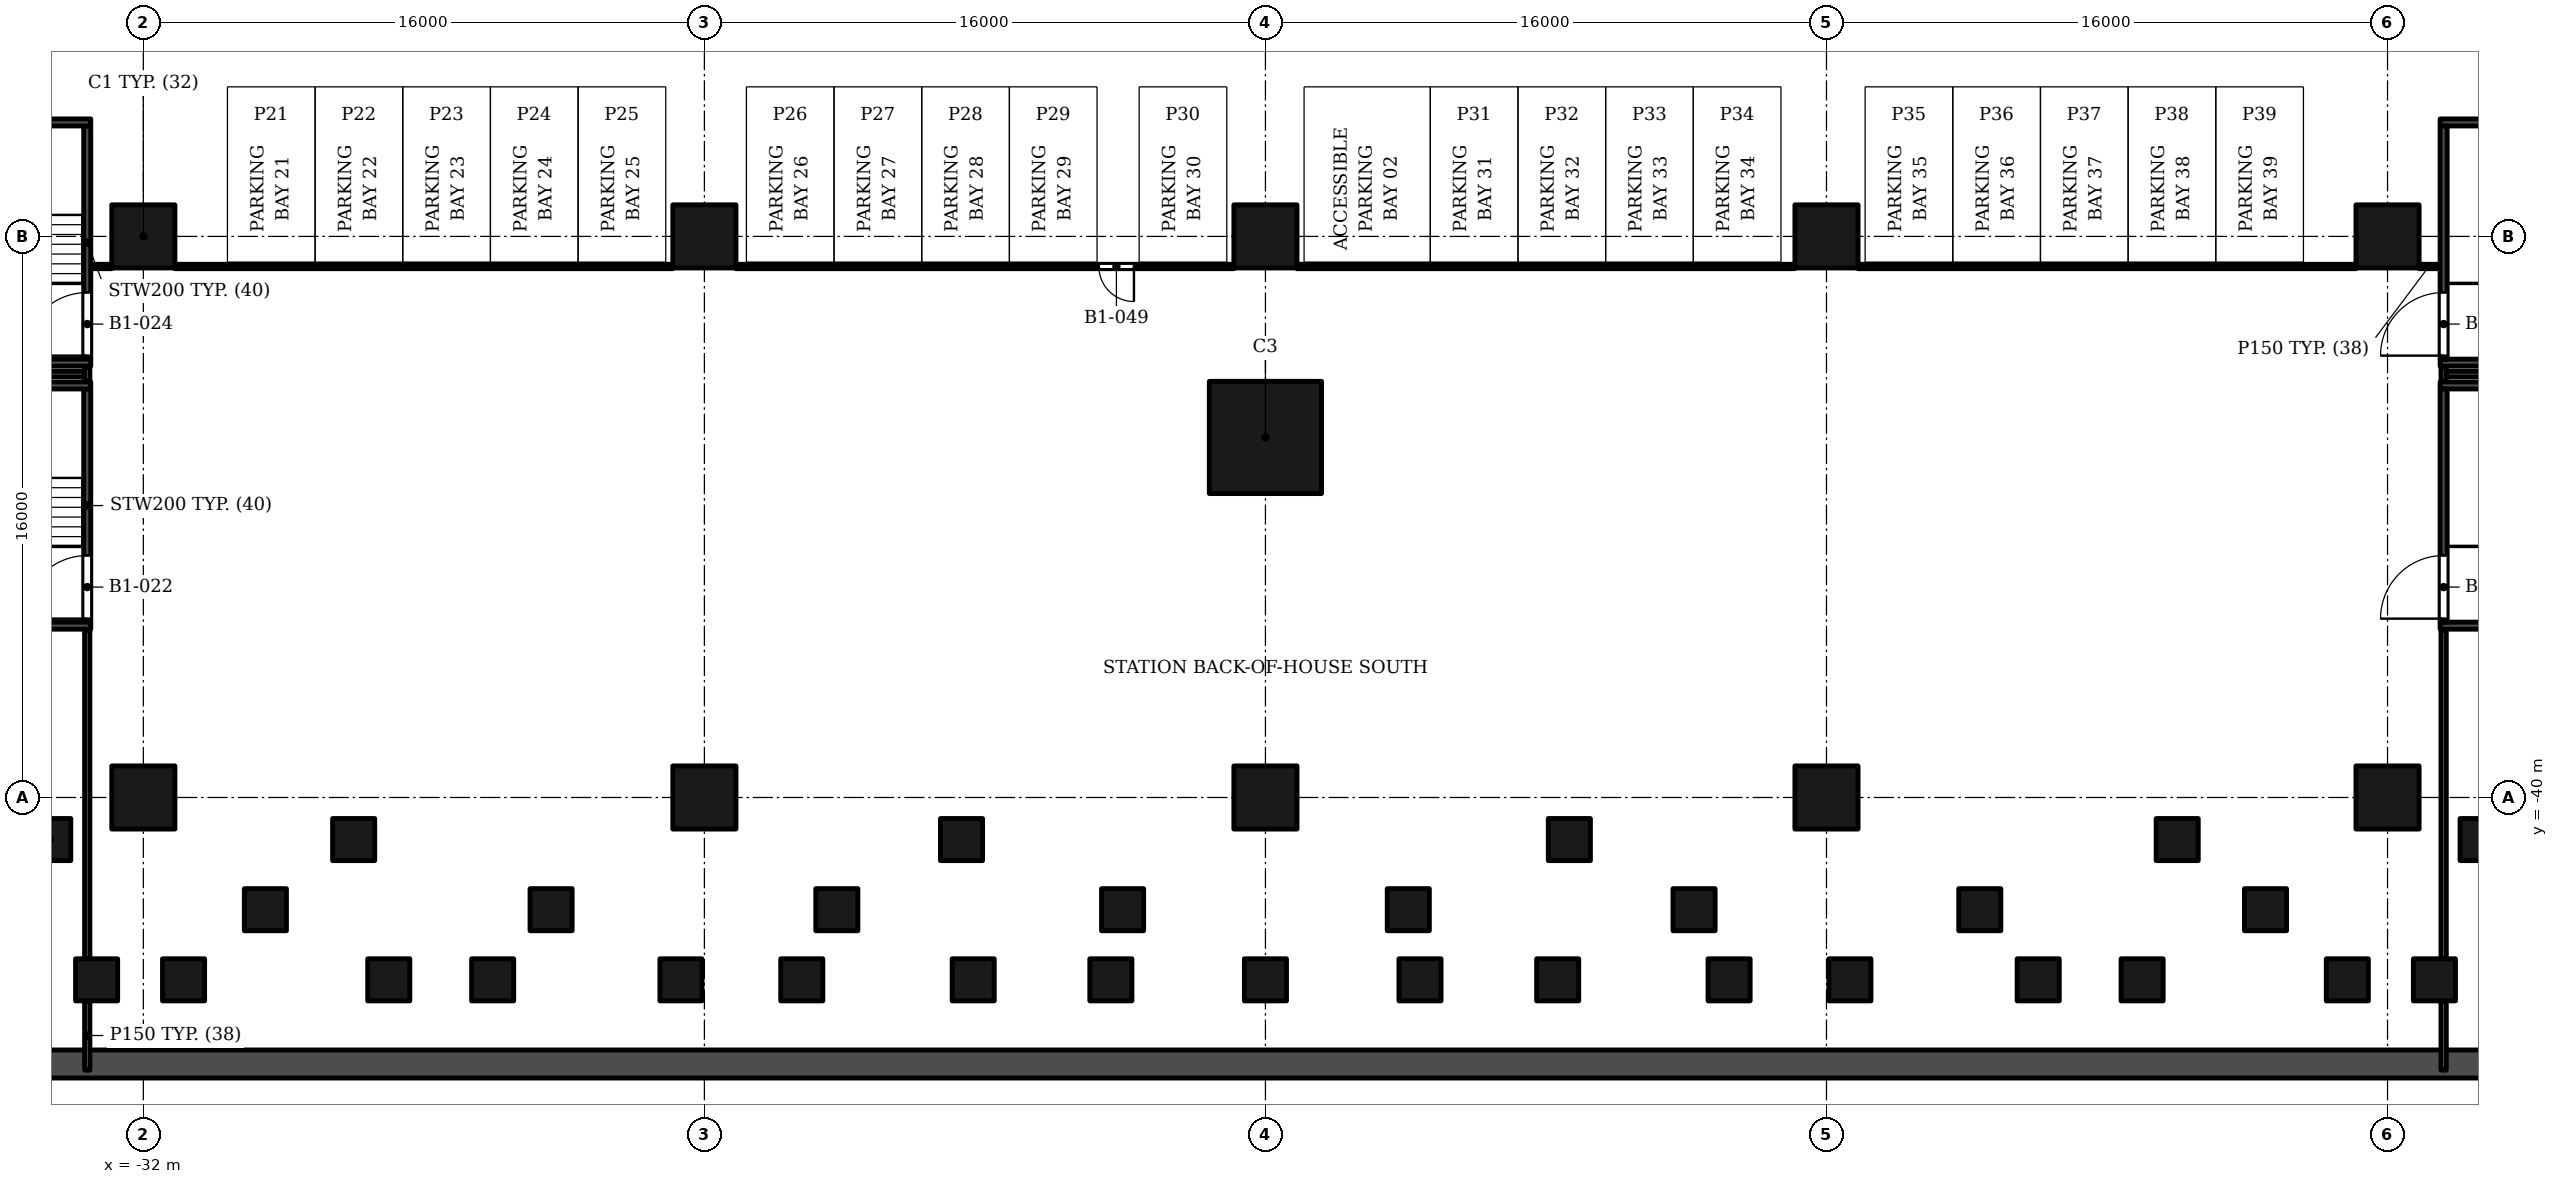
"""IFC4 building model, lengths in metres.
Left out: names, types, materials, properties, quantities, classifications, styles, units other than length and angle.
Written with IfcOpenShell. Run it as: python <this file> out.ifc"""

import sys

from ifc_helpers import new_model, si_unit, direction, frame, frame_2d, origin, origin_2d, place, context, subcontext, project, spatial, rectangle, extrude, element, fill, save


model = new_model("IFC4")
c1 = context("Model", 3, precision=1e-05, world=origin(), true_north=direction((0.0, 1.0)))
c2 = subcontext(c1, "Body", "Model", "MODEL_VIEW")
j1 = project(units=[si_unit("LENGTHUNIT", "METRE"), si_unit("PLANEANGLEUNIT", "RADIAN")], contexts=[c1])
p1 = place(None, origin())
s1 = spatial("IfcSite", under=j1, at=p1, CompositionType="ELEMENT")
p2 = place(p1, origin())
s2 = spatial("IfcBuilding", under=s1, at=p2, CompositionType="ELEMENT")
p3 = place(p2, frame((0.0, 0.0, -5.0)))
s3 = spatial("IfcBuildingStorey", under=s2, at=p3, CompositionType="ELEMENT", Elevation=-5.0)
p4 = place(p3, frame((-46.0, -47.6, 0.0), z_axis=(0.0, 0.0, 1.0), x_axis=(1.0, 0.0, 0.0)))
e1 = element("IfcWall", 1, at=p4, inside=s3, PredefinedType="SHEAR", context=c2, shape_type="SweptSolid", body=[
    extrude(rectangle(XDim=92.0, YDim=0.8, at=frame_2d((46.0, 0.0))), origin(), (0.0, 0.0, 1.0), 5.0),
])
for number, where, z_axis, x_axis in (
    (2, (-32.0, -40.0, 0.0), (0.0, 0.0, 1.0), (1.0, 0.0, 0.0)),
    (3, (-32.0, -24.0, 0.0), (0.0, 0.0, 1.0), (1.0, 0.0, 0.0)),
    (4, (-16.0, -40.0, 0.0), (0.0, 0.0, 1.0), (1.0, 0.0, 0.0)),
    (5, (-16.0, -24.0, 0.0), (0.0, 0.0, 1.0), (1.0, 0.0, 0.0)),
    (6, (0.0, -40.0, 0.0), (0.0, 0.0, 1.0), (1.0, 0.0, 0.0)),
    (7, (0.0, -24.0, 0.0), (0.0, 0.0, 1.0), (1.0, 0.0, 0.0)),
    (8, (16.0, -40.0, 0.0), (0.0, 0.0, 1.0), (1.0, 0.0, 0.0)),
    (9, (16.0, -24.0, 0.0), (0.0, 0.0, 1.0), (1.0, 0.0, 0.0)),
    (10, (32.0, -40.0, 0.0), (0.0, 0.0, 1.0), (1.0, 0.0, 0.0)),
    (11, (32.0, -24.0, 0.0), (0.0, 0.0, 1.0), (1.0, 0.0, 0.0)),
):
    element("IfcColumn", number, at=place(p3, frame(where, z_axis=z_axis, x_axis=x_axis)), inside=s3, PredefinedType="COLUMN", context=c2, shape_type="SweptSolid", body=[
        extrude(rectangle(XDim=1.8, YDim=1.8, at=origin_2d()), origin(), (0.0, 0.0, 1.0), 5.0),
    ])
for number, where, z_axis, x_axis in (
    (12, (-34.669, -41.2, 0.0), (0.0, 0.0, 1.0), (1.0, 0.0, 0.0)),
    (13, (34.669, -41.2, 0.0), (0.0, 0.0, 1.0), (1.0, 0.0, 0.0)),
    (14, (26.002, -41.2, 0.0), (0.0, 0.0, 1.0), (1.0, 0.0, 0.0)),
    (15, (8.667, -41.2, 0.0), (0.0, 0.0, 1.0), (1.0, 0.0, 0.0)),
    (16, (-8.667, -41.2, 0.0), (0.0, 0.0, 1.0), (1.0, 0.0, 0.0)),
    (17, (-26.002, -41.2, 0.0), (0.0, 0.0, 1.0), (1.0, 0.0, 0.0)),
    (18, (28.52, -43.2, 0.0), (0.0, 0.0, 1.0), (1.0, 0.0, 0.0)),
    (19, (20.372, -43.2, 0.0), (0.0, 0.0, 1.0), (1.0, 0.0, 0.0)),
    (20, (12.223, -43.2, 0.0), (0.0, 0.0, 1.0), (1.0, 0.0, 0.0)),
    (21, (4.074, -43.2, 0.0), (0.0, 0.0, 1.0), (1.0, 0.0, 0.0)),
    (22, (-4.074, -43.2, 0.0), (0.0, 0.0, 1.0), (1.0, 0.0, 0.0)),
    (23, (-12.223, -43.2, 0.0), (0.0, 0.0, 1.0), (1.0, 0.0, 0.0)),
    (24, (-20.372, -43.2, 0.0), (0.0, 0.0, 1.0), (1.0, 0.0, 0.0)),
    (25, (-28.52, -43.2, 0.0), (0.0, 0.0, 1.0), (1.0, 0.0, 0.0)),
    (26, (30.853, -45.2, 0.0), (0.0, 0.0, 1.0), (1.0, 0.0, 0.0)),
    (27, (22.038, -45.2, 0.0), (0.0, 0.0, 1.0), (1.0, 0.0, 0.0)),
    (28, (13.223, -45.2, 0.0), (0.0, 0.0, 1.0), (1.0, 0.0, 0.0)),
    (29, (4.408, -45.2, 0.0), (0.0, 0.0, 1.0), (1.0, 0.0, 0.0)),
    (30, (-4.408, -45.2, 0.0), (0.0, 0.0, 1.0), (1.0, 0.0, 0.0)),
    (31, (-13.223, -45.2, 0.0), (0.0, 0.0, 1.0), (1.0, 0.0, 0.0)),
    (32, (-22.038, -45.2, 0.0), (0.0, 0.0, 1.0), (1.0, 0.0, 0.0)),
    (33, (-30.853, -45.2, 0.0), (0.0, 0.0, 1.0), (1.0, 0.0, 0.0)),
    (34, (33.337, -45.2, 0.0), (0.0, 0.0, 1.0), (1.0, 0.0, 0.0)),
    (35, (25.001, -45.2, 0.0), (0.0, 0.0, 1.0), (1.0, 0.0, 0.0)),
    (36, (16.668, -45.2, 0.0), (0.0, 0.0, 1.0), (1.0, 0.0, 0.0)),
    (37, (8.334, -45.2, 0.0), (0.0, 0.0, 1.0), (1.0, 0.0, 0.0)),
    (38, (0.0, -45.2, 0.0), (0.0, 0.0, 1.0), (1.0, 0.0, 0.0)),
    (39, (-8.334, -45.2, 0.0), (0.0, 0.0, 1.0), (1.0, 0.0, 0.0)),
    (40, (-16.668, -45.2, 0.0), (0.0, 0.0, 1.0), (1.0, 0.0, 0.0)),
    (41, (-25.001, -45.2, 0.0), (0.0, 0.0, 1.0), (1.0, 0.0, 0.0)),
    (42, (-33.333, -45.2, 0.0), (0.0, 0.0, 1.0), (1.0, 0.0, 0.0)),
):
    element("IfcColumn", number, at=place(p3, frame(where, z_axis=z_axis, x_axis=x_axis)), inside=s3, PredefinedType="COLUMN", context=c2, shape_type="SweptSolid", body=[
        extrude(rectangle(XDim=1.2, YDim=1.2, at=origin_2d()), origin(), (0.0, 0.0, 1.0), 5.0),
    ])
p5 = place(p3, frame((0.0, -29.733, 0.0), z_axis=(0.0, 0.0, 1.0), x_axis=(0.0, 1.0, 0.0)))
e43 = element("IfcColumn", 43, at=p5, inside=s3, PredefinedType="COLUMN", context=c2, shape_type="SweptSolid", body=[
    extrude(rectangle(XDim=3.2, YDim=3.2, at=origin_2d()), origin(), (0.0, 0.0, 1.0), 5.0),
])
for number, where, z_axis, x_axis in (
    (44, (-38.37, -35.1, 0.0), (0.0, 0.0, 1.0), (1.0, 0.0, 0.0)),
    (45, (-38.37, -28.25, 0.0), (0.0, 0.0, 1.0), (1.0, 0.0, 0.0)),
):
    element("IfcWall", number, at=place(p3, frame(where, z_axis=z_axis, x_axis=x_axis)), inside=s3, PredefinedType="SOLIDWALL", context=c2, shape_type="SweptSolid", body=[
        extrude(rectangle(XDim=4.87, YDim=0.2, at=frame_2d((2.435, 0.0))), origin(), (0.0, 0.0, 1.0), 4.45),
    ])
p6 = place(p3, frame((-33.6, -35.0, 0.0), z_axis=(0.0, 0.0, 1.0), x_axis=(0.0, 1.0, 0.0)))
e46 = element("IfcWall", 46, at=p6, inside=s3, PredefinedType="SOLIDWALL", context=c2, shape_type="SweptSolid", body=[
    extrude(rectangle(XDim=6.65, YDim=0.2, at=frame_2d((3.325, 0.0))), origin(), (0.0, 0.0, 1.0), 4.45),
])
p7 = place(p6, frame((0.1, 0.0, 0.0)))
e47 = element("IfcOpeningElement", 47, at=p7, cuts=e46, PredefinedType="OPENING", context=c2, shape_type="SweptSolid", body=[
    extrude(rectangle(XDim=1.8, YDim=2.4, at=frame_2d((0.9, 1.2))), frame((0.0, 0.11, 0.0), z_axis=(0.0, -1.0, 0.0), x_axis=(1.0, 0.0, 0.0)), (0.0, 0.0, 1.0), 0.22),
])
for number, where, z_axis, x_axis in (
    (48, (-38.37, -27.6, 0.0), (0.0, 0.0, 1.0), (1.0, 0.0, 0.0)),
    (49, (-38.37, -20.75, 0.0), (0.0, 0.0, 1.0), (1.0, 0.0, 0.0)),
):
    element("IfcWall", number, at=place(p3, frame(where, z_axis=z_axis, x_axis=x_axis)), inside=s3, PredefinedType="SOLIDWALL", context=c2, shape_type="SweptSolid", body=[
        extrude(rectangle(XDim=4.87, YDim=0.2, at=frame_2d((2.435, 0.0))), origin(), (0.0, 0.0, 1.0), 4.45),
    ])
p8 = place(p3, frame((-33.6, -27.5, 0.0), z_axis=(0.0, 0.0, 1.0), x_axis=(0.0, 1.0, 0.0)))
e50 = element("IfcWall", 50, at=p8, inside=s3, PredefinedType="SOLIDWALL", context=c2, shape_type="SweptSolid", body=[
    extrude(rectangle(XDim=6.65, YDim=0.2, at=frame_2d((3.325, 0.0))), origin(), (0.0, 0.0, 1.0), 4.45),
])
p9 = place(p8, frame((0.1, 0.0, 0.0)))
e51 = element("IfcOpeningElement", 51, at=p9, cuts=e50, PredefinedType="OPENING", context=c2, shape_type="SweptSolid", body=[
    extrude(rectangle(XDim=1.8, YDim=2.4, at=frame_2d((0.9, 1.2))), frame((0.0, 0.11, 0.0), z_axis=(0.0, -1.0, 0.0), x_axis=(1.0, 0.0, 0.0)), (0.0, 0.0, 1.0), 0.22),
])
for number, where, z_axis, x_axis in (
    (52, (33.5, -35.1, 0.0), (0.0, 0.0, 1.0), (1.0, 0.0, 0.0)),
    (53, (33.5, -28.25, 0.0), (0.0, 0.0, 1.0), (1.0, 0.0, 0.0)),
):
    element("IfcWall", number, at=place(p3, frame(where, z_axis=z_axis, x_axis=x_axis)), inside=s3, PredefinedType="SOLIDWALL", context=c2, shape_type="SweptSolid", body=[
        extrude(rectangle(XDim=4.87, YDim=0.2, at=frame_2d((2.435, 0.0))), origin(), (0.0, 0.0, 1.0), 4.45),
    ])
p10 = place(p3, frame((33.6, -35.0, 0.0), z_axis=(0.0, 0.0, 1.0), x_axis=(0.0, 1.0, 0.0)))
e54 = element("IfcWall", 54, at=p10, inside=s3, PredefinedType="SOLIDWALL", context=c2, shape_type="SweptSolid", body=[
    extrude(rectangle(XDim=6.65, YDim=0.2, at=frame_2d((3.325, 0.0))), origin(), (0.0, 0.0, 1.0), 4.45),
])
p11 = place(p10, frame((0.1, 0.0, 0.0)))
e55 = element("IfcOpeningElement", 55, at=p11, cuts=e54, PredefinedType="OPENING", context=c2, shape_type="SweptSolid", body=[
    extrude(rectangle(XDim=1.8, YDim=2.4, at=frame_2d((0.9, 1.2))), frame((0.0, 0.11, 0.0), z_axis=(0.0, -1.0, 0.0), x_axis=(1.0, 0.0, 0.0)), (0.0, 0.0, 1.0), 0.22),
])
for number, where, z_axis, x_axis in (
    (56, (33.5, -27.6, 0.0), (0.0, 0.0, 1.0), (1.0, 0.0, 0.0)),
    (57, (33.5, -20.75, 0.0), (0.0, 0.0, 1.0), (1.0, 0.0, 0.0)),
):
    element("IfcWall", number, at=place(p3, frame(where, z_axis=z_axis, x_axis=x_axis)), inside=s3, PredefinedType="SOLIDWALL", context=c2, shape_type="SweptSolid", body=[
        extrude(rectangle(XDim=4.87, YDim=0.2, at=frame_2d((2.435, 0.0))), origin(), (0.0, 0.0, 1.0), 4.45),
    ])
p12 = place(p3, frame((33.6, -27.5, 0.0), z_axis=(0.0, 0.0, 1.0), x_axis=(0.0, 1.0, 0.0)))
e58 = element("IfcWall", 58, at=p12, inside=s3, PredefinedType="SOLIDWALL", context=c2, shape_type="SweptSolid", body=[
    extrude(rectangle(XDim=6.65, YDim=0.2, at=frame_2d((3.325, 0.0))), origin(), (0.0, 0.0, 1.0), 4.45),
])
p13 = place(p12, frame((0.1, 0.0, 0.0)))
e59 = element("IfcOpeningElement", 59, at=p13, cuts=e58, PredefinedType="OPENING", context=c2, shape_type="SweptSolid", body=[
    extrude(rectangle(XDim=1.8, YDim=2.4, at=frame_2d((0.9, 1.2))), frame((0.0, 0.11, 0.0), z_axis=(0.0, -1.0, 0.0), x_axis=(1.0, 0.0, 0.0)), (0.0, 0.0, 1.0), 0.22),
])
for number, where, z_axis, x_axis in (
    (60, (-33.6, -47.775, 0.0), (0.0, 0.0, 1.0), (0.0, 1.0, 0.0)),
    (61, (33.6, -47.775, 0.0), (0.0, 0.0, 1.0), (0.0, 1.0, 0.0)),
):
    element("IfcWall", number, at=place(p3, frame(where, z_axis=z_axis, x_axis=x_axis)), inside=s3, PredefinedType="PARTITIONING", context=c2, shape_type="SweptSolid", body=[
        extrude(rectangle(XDim=1.975, YDim=0.15, at=frame_2d((0.987, 0.0))), origin(), (0.0, 0.0, 1.0), 4.45),
    ])
for number, where, z_axis, x_axis in (
    (62, (-33.6, -44.6, 0.0), (0.0, 0.0, 1.0), (0.0, 1.0, 0.0)),
    (63, (33.6, -44.6, 0.0), (0.0, 0.0, 1.0), (0.0, 1.0, 0.0)),
):
    element("IfcWall", number, at=place(p3, frame(where, z_axis=z_axis, x_axis=x_axis)), inside=s3, PredefinedType="PARTITIONING", context=c2, shape_type="SweptSolid", body=[
        extrude(rectangle(XDim=9.36, YDim=0.15, at=frame_2d((4.68, 0.0))), origin(), (0.0, 0.0, 1.0), 3.25),
    ])
for number, where, z_axis, x_axis in (
    (64, (-33.6, -28.11, 0.0), (0.0, 0.0, 1.0), (0.0, 1.0, 0.0)),
    (65, (33.6, -28.11, 0.0), (0.0, 0.0, 1.0), (0.0, 1.0, 0.0)),
):
    element("IfcWall", number, at=place(p3, frame(where, z_axis=z_axis, x_axis=x_axis)), inside=s3, PredefinedType="PARTITIONING", context=c2, shape_type="SweptSolid", body=[
        extrude(rectangle(XDim=0.37, YDim=0.15, at=frame_2d((0.185, 0.0))), origin(), (0.0, 0.0, 1.0), 4.45),
    ])
for number, where, z_axis, x_axis in (
    (66, (-51.775, -27.925, 0.0), (0.0, 0.0, 1.0), (1.0, 0.0, 0.0)),
    (67, (33.675, -27.925, 0.0), (0.0, 0.0, 1.0), (1.0, 0.0, 0.0)),
):
    element("IfcWall", number, at=place(p3, frame(where, z_axis=z_axis, x_axis=x_axis)), inside=s3, PredefinedType="PARTITIONING", context=c2, shape_type="SweptSolid", body=[
        extrude(rectangle(XDim=18.1, YDim=0.15, at=frame_2d((9.05, 0.0))), origin(), (0.0, 0.0, 1.0), 3.55),
    ])
p14 = place(p3, frame((-33.46, -24.857, 0.0), z_axis=(0.0, 0.0, 1.0), x_axis=(1.0, 0.0, 0.0)))
e68 = element("IfcWall", 68, at=p14, inside=s3, PredefinedType="PARTITIONING", context=c2, shape_type="SweptSolid", body=[
    extrude(rectangle(XDim=0.56, YDim=0.125, at=frame_2d((0.28, 0.0))), origin(), (0.0, 0.0, 1.0), 4.45),
])
p15 = place(p3, frame((-31.1, -24.857, 0.0), z_axis=(0.0, 0.0, 1.0), x_axis=(1.0, 0.0, 0.0)))
e69 = element("IfcWall", 69, at=p15, inside=s3, PredefinedType="PARTITIONING", context=c2, shape_type="SweptSolid", body=[
    extrude(rectangle(XDim=14.2, YDim=0.125, at=frame_2d((7.1, 0.0))), origin(), (0.0, 0.0, 1.0), 3.55),
])
p16 = place(p3, frame((-15.1, -24.857, 0.0), z_axis=(0.0, 0.0, 1.0), x_axis=(1.0, 0.0, 0.0)))
e70 = element("IfcWall", 70, at=p16, inside=s3, PredefinedType="PARTITIONING", context=c2, shape_type="SweptSolid", body=[
    extrude(rectangle(XDim=14.2, YDim=0.125, at=frame_2d((7.1, 0.0))), origin(), (0.0, 0.0, 1.0), 3.55),
])
p17 = place(p16, frame((10.35, 0.0, 0.0)))
e71 = element("IfcOpeningElement", 71, at=p17, cuts=e70, PredefinedType="OPENING", context=c2, shape_type="SweptSolid", body=[
    extrude(rectangle(XDim=1.0, YDim=2.1, at=frame_2d((0.5, 1.05))), frame((0.0, 0.073, 0.0), z_axis=(0.0, -1.0, 0.0), x_axis=(1.0, 0.0, 0.0)), (0.0, 0.0, 1.0), 0.145),
])
for number, where, z_axis, x_axis in (
    (72, (0.9, -24.857, 0.0), (0.0, 0.0, 1.0), (1.0, 0.0, 0.0)),
    (73, (16.9, -24.857, 0.0), (0.0, 0.0, 1.0), (1.0, 0.0, 0.0)),
):
    element("IfcWall", number, at=place(p3, frame(where, z_axis=z_axis, x_axis=x_axis)), inside=s3, PredefinedType="PARTITIONING", context=c2, shape_type="SweptSolid", body=[
        extrude(rectangle(XDim=14.2, YDim=0.125, at=frame_2d((7.1, 0.0))), origin(), (0.0, 0.0, 1.0), 3.55),
    ])
p18 = place(p3, frame((32.9, -24.857, 0.0), z_axis=(0.0, 0.0, 1.0), x_axis=(1.0, 0.0, 0.0)))
e74 = element("IfcWall", 74, at=p18, inside=s3, PredefinedType="PARTITIONING", context=c2, shape_type="SweptSolid", body=[
    extrude(rectangle(XDim=0.56, YDim=0.125, at=frame_2d((0.28, 0.0))), origin(), (0.0, 0.0, 1.0), 4.45),
])
p19 = place(p7, origin())
e75 = element("IfcDoor", 75, at=p19, inside=s3, OperationType="DOUBLE_DOOR_SINGLE_SWING", PredefinedType="DOOR", context=c2, shape_type="SweptSolid", body=[
    extrude(rectangle(XDim=1.8, YDim=2.4, at=frame_2d((0.9, 1.2))), frame((0.0, 0.025, 0.0), z_axis=(0.0, -1.0, 0.0), x_axis=(1.0, 0.0, 0.0)), (0.0, 0.0, 1.0), 0.05),
])
fill(e47, e75)
p20 = place(p9, origin())
e76 = element("IfcDoor", 76, at=p20, inside=s3, OperationType="DOUBLE_DOOR_SINGLE_SWING", PredefinedType="DOOR", context=c2, shape_type="SweptSolid", body=[
    extrude(rectangle(XDim=1.8, YDim=2.4, at=frame_2d((0.9, 1.2))), frame((0.0, 0.025, 0.0), z_axis=(0.0, -1.0, 0.0), x_axis=(1.0, 0.0, 0.0)), (0.0, 0.0, 1.0), 0.05),
])
fill(e51, e76)
p21 = place(p11, origin())
e77 = element("IfcDoor", 77, at=p21, inside=s3, OperationType="DOUBLE_DOOR_SINGLE_SWING", PredefinedType="DOOR", context=c2, shape_type="SweptSolid", body=[
    extrude(rectangle(XDim=1.8, YDim=2.4, at=frame_2d((0.9, 1.2))), frame((0.0, 0.025, 0.0), z_axis=(0.0, -1.0, 0.0), x_axis=(1.0, 0.0, 0.0)), (0.0, 0.0, 1.0), 0.05),
])
fill(e55, e77)
p22 = place(p13, origin())
e78 = element("IfcDoor", 78, at=p22, inside=s3, OperationType="DOUBLE_DOOR_SINGLE_SWING", PredefinedType="DOOR", context=c2, shape_type="SweptSolid", body=[
    extrude(rectangle(XDim=1.8, YDim=2.4, at=frame_2d((0.9, 1.2))), frame((0.0, 0.025, 0.0), z_axis=(0.0, -1.0, 0.0), x_axis=(1.0, 0.0, 0.0)), (0.0, 0.0, 1.0), 0.05),
])
fill(e59, e78)
p23 = place(p17, origin())
e79 = element("IfcDoor", 79, at=p23, inside=s3, OperationType="SINGLE_SWING_RIGHT", PredefinedType="DOOR", context=c2, shape_type="SweptSolid", body=[
    extrude(rectangle(XDim=1.0, YDim=2.1, at=frame_2d((0.5, 1.05))), frame((0.0, 0.025, 0.0), z_axis=(0.0, -1.0, 0.0), x_axis=(1.0, 0.0, 0.0)), (0.0, 0.0, 1.0), 0.05),
])
fill(e71, e79)
save(model, sys.argv[1])
